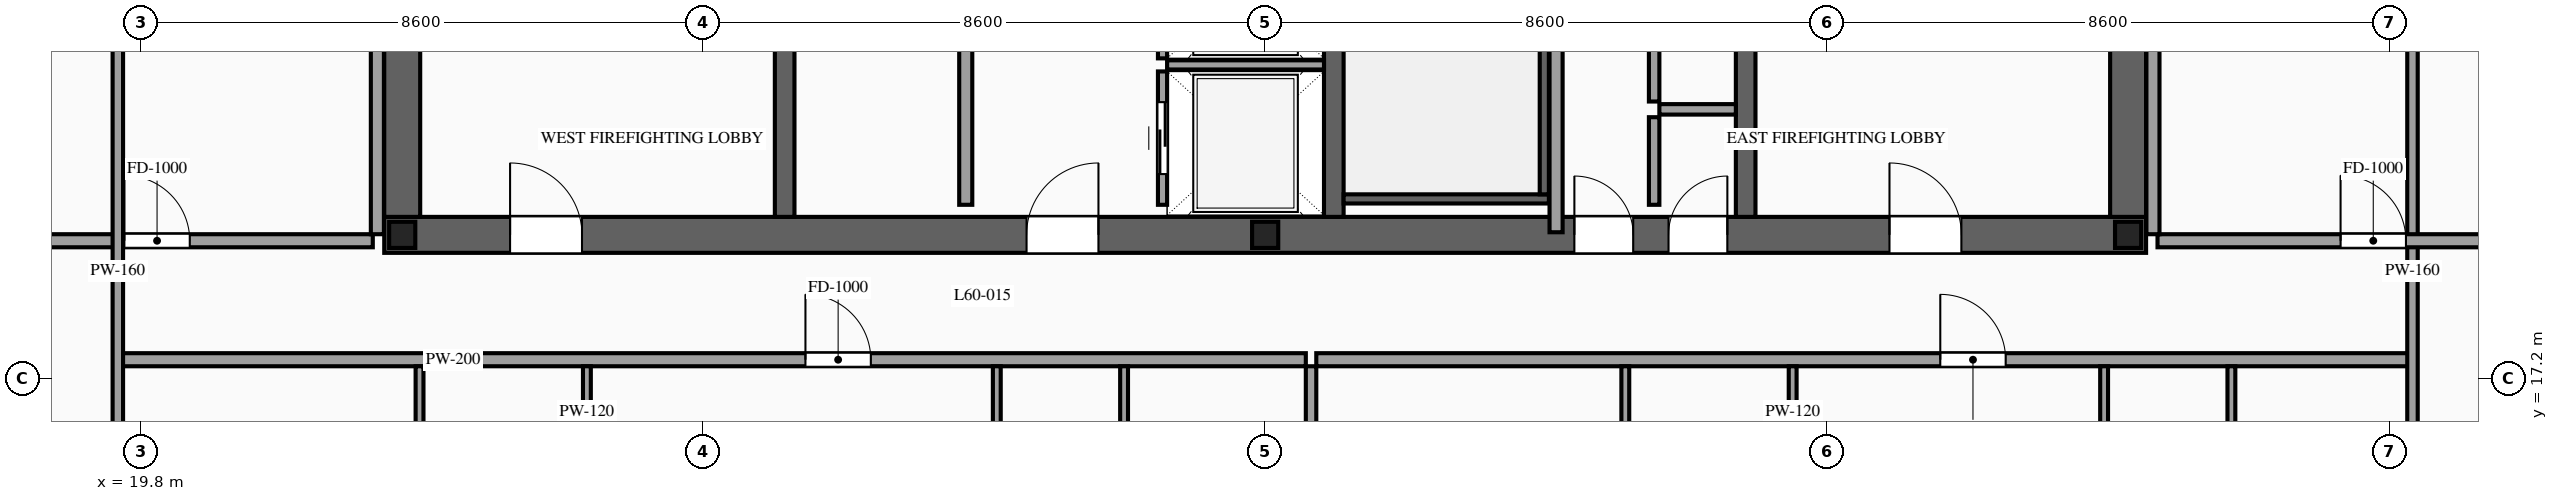
"""IFC4 building model, lengths in metres.
Left out: names, types, materials, properties, quantities, classifications, styles, units other than length and angle.
Written with IfcOpenShell. Run it as: python <this file> out.ifc"""

import sys

from ifc_helpers import new_model, si_unit, direction, frame, frame_2d, origin, origin_2d, place, context, subcontext, project, spatial, rectangle, i_section, extrude, source, transform, mapped, element, fill, save


model = new_model("IFC4")
c1 = context("Model", 3, precision=1e-05, world=origin(), true_north=direction((0.0, 1.0)))
c2 = subcontext(c1, "Body", "Model", "MODEL_VIEW")
j1 = project(units=[si_unit("LENGTHUNIT", "METRE"), si_unit("PLANEANGLEUNIT", "RADIAN")], contexts=[c1])
p1 = place(None, origin())
s1 = spatial("IfcSite", under=j1, at=p1, CompositionType="ELEMENT")
p2 = place(p1, origin())
s2 = spatial("IfcBuilding", under=s1, at=p2, CompositionType="ELEMENT")
p3 = place(p2, frame((0.0, 0.0, 227.6)))
s3 = spatial("IfcBuildingStorey", under=s2, at=p3, CompositionType="ELEMENT", Elevation=227.6)
p4 = place(p3, frame((23.525, 19.4, 0.0), z_axis=(0.0, 0.0, 1.0), x_axis=(1.0, 0.0, 0.0)))
e1 = element("IfcWall", 1, at=p4, inside=s3, PredefinedType="SHEAR", context=c2, shape_type="SweptSolid", body=[
    extrude(rectangle(XDim=26.95, YDim=0.55, at=frame_2d((13.475, 0.0))), origin(), (0.0, 0.0, 1.0), 3.5),
])
p5 = place(p4, frame((1.925, 0.0, 0.0)))
e2 = element("IfcOpeningElement", 2, at=p5, cuts=e1, PredefinedType="OPENING", context=c2, shape_type="SweptSolid", body=[
    extrude(rectangle(XDim=1.1, YDim=2.2, at=frame_2d((0.55, 1.1))), frame((0.0, 0.29, 0.0), z_axis=(0.0, -1.0, 0.0), x_axis=(1.0, 0.0, 0.0)), (0.0, 0.0, 1.0), 0.58),
])
p6 = place(p4, frame((9.825, 0.0, 0.0)))
e3 = element("IfcOpeningElement", 3, at=p6, cuts=e1, PredefinedType="OPENING", context=c2, shape_type="SweptSolid", body=[
    extrude(rectangle(XDim=1.1, YDim=2.2, at=frame_2d((0.55, 1.1))), frame((0.0, 0.29, 0.0), z_axis=(0.0, -1.0, 0.0), x_axis=(1.0, 0.0, 0.0)), (0.0, 0.0, 1.0), 0.58),
])
p7 = place(p4, frame((23.025, 0.0, 0.0)))
e4 = element("IfcOpeningElement", 4, at=p7, cuts=e1, PredefinedType="OPENING", context=c2, shape_type="SweptSolid", body=[
    extrude(rectangle(XDim=1.1, YDim=2.2, at=frame_2d((0.55, 1.1))), frame((0.0, 0.29, 0.0), z_axis=(0.0, -1.0, 0.0), x_axis=(1.0, 0.0, 0.0)), (0.0, 0.0, 1.0), 0.58),
])
p8 = place(p4, frame((19.645, 0.0, 0.0)))
e5 = element("IfcOpeningElement", 5, at=p8, cuts=e1, PredefinedType="OPENING", context=c2, shape_type="SweptSolid", body=[
    extrude(rectangle(XDim=0.9, YDim=2.15, at=frame_2d((0.45, 1.075))), frame((0.0, 0.29, 0.0), z_axis=(0.0, -1.0, 0.0), x_axis=(1.0, 0.0, 0.0)), (0.0, 0.0, 1.0), 0.58),
])
p9 = place(p4, frame((18.205, 0.0, 0.0)))
e6 = element("IfcOpeningElement", 6, at=p9, cuts=e1, PredefinedType="OPENING", context=c2, shape_type="SweptSolid", body=[
    extrude(rectangle(XDim=0.9, YDim=2.15, at=frame_2d((0.45, 1.075))), frame((0.0, 0.29, 0.0), z_axis=(0.0, -1.0, 0.0), x_axis=(1.0, 0.0, 0.0)), (0.0, 0.0, 1.0), 0.58),
])
m1 = source(origin(), c2, "Body", "SweptSolid", [
    extrude(rectangle(XDim=12.25, YDim=0.55, at=frame_2d((6.125, 0.0))), origin(), (0.0, 0.0, 1.0), 3.5),
])
for number, where, z_axis, x_axis in (
    (7, (23.8, 19.675, 0.0), (0.0, 0.0, 1.0), (0.0, 1.0, 0.0)),
    (8, (50.2, 19.675, 0.0), (0.0, 0.0, 1.0), (0.0, 1.0, 0.0)),
):
    element("IfcWall", number, at=place(p3, frame(where, z_axis=z_axis, x_axis=x_axis)), inside=s3, PredefinedType="SHEAR", context=c2, shape_type="MappedRepresentation", body=[
        mapped(m1, transform((0.0, 0.0, 0.0), scale=1.0)),
    ])
m2 = source(origin(), c2, "Body", "SweptSolid", [
    extrude(rectangle(XDim=12.25, YDim=0.3, at=frame_2d((6.125, 0.0))), origin(), (0.0, 0.0, 1.0), 3.5),
])
for number, where, z_axis, x_axis in (
    (9, (29.65, 19.675, 0.0), (0.0, 0.0, 1.0), (0.0, 1.0, 0.0)),
    (10, (38.05, 19.675, 0.0), (0.0, 0.0, 1.0), (0.0, 1.0, 0.0)),
    (11, (44.35, 19.675, 0.0), (0.0, 0.0, 1.0), (0.0, 1.0, 0.0)),
):
    element("IfcWall", number, at=place(p3, frame(where, z_axis=z_axis, x_axis=x_axis)), inside=s3, PredefinedType="SOLIDWALL", context=c2, shape_type="MappedRepresentation", body=[
        mapped(m2, transform((0.0, 0.0, 0.0), scale=1.0)),
    ])
m3 = source(origin(), c2, "Body", "SweptSolid", [
    extrude(i_section(OverallWidth=0.4, OverallDepth=0.4, WebThickness=0.013, FlangeThickness=0.021, at=origin_2d()), origin(), (0.0, 0.0, 1.0), 3.5),
])
for number, where, z_axis, x_axis in (
    (12, (23.8, 19.4, 0.0), (0.0, 0.0, 1.0), (1.0, 0.0, 0.0)),
    (13, (37.0, 19.4, 0.0), (0.0, 0.0, 1.0), (1.0, 0.0, 0.0)),
    (14, (50.2, 19.4, 0.0), (0.0, 0.0, 1.0), (1.0, 0.0, 0.0)),
):
    element("IfcColumn", number, at=place(p3, frame(where, z_axis=z_axis, x_axis=x_axis)), inside=s3, PredefinedType="COLUMN", context=c2, shape_type="MappedRepresentation", body=[
        mapped(m3, transform((0.0, 0.0, 0.0), scale=1.0)),
    ])
p10 = place(p3, frame((35.43, 19.86, 0.0), z_axis=(0.0, 0.0, 1.0), x_axis=(0.0, 1.0, 0.0)))
e15 = element("IfcWall", 15, at=p10, inside=s3, PredefinedType="SOLIDWALL", context=c2, shape_type="SweptSolid", body=[
    extrude(rectangle(XDim=2.04, YDim=0.14, at=frame_2d((1.02, 0.0))), origin(), (0.0, 0.0, 1.0), 3.28),
])
p11 = place(p10, frame((0.47, 0.0, 0.0)))
e16 = element("IfcOpeningElement", 16, at=p11, cuts=e15, PredefinedType="OPENING", context=c2, shape_type="SweptSolid", body=[
    extrude(rectangle(XDim=1.1, YDim=2.2, at=frame_2d((0.55, 1.1))), frame((0.0, 0.085, 0.0), z_axis=(0.0, -1.0, 0.0), x_axis=(1.0, 0.0, 0.0)), (0.0, 0.0, 1.0), 0.17),
])
m4 = source(origin(), c2, "Body", "SweptSolid", [
    extrude(rectangle(XDim=2.4, YDim=0.14, at=frame_2d((1.2, 0.0))), origin(), (0.0, 0.0, 1.0), 3.28),
])
p12 = place(p3, frame((35.5, 22.0, 0.0), z_axis=(0.0, 0.0, 1.0), x_axis=(1.0, 0.0, 0.0)))
e17 = element("IfcWall", 17, at=p12, inside=s3, PredefinedType="SOLIDWALL", context=c2, shape_type="MappedRepresentation", body=[
    mapped(m4, transform((0.0, 0.0, 0.0), scale=1.0)),
])
p13 = place(p3, frame((35.43, 22.1, 0.0), z_axis=(0.0, 0.0, 1.0), x_axis=(0.0, 1.0, 0.0)))
e18 = element("IfcWall", 18, at=p13, inside=s3, PredefinedType="SOLIDWALL", context=c2, shape_type="SweptSolid", body=[
    extrude(rectangle(XDim=2.2, YDim=0.14, at=frame_2d((1.1, 0.0))), origin(), (0.0, 0.0, 1.0), 3.28),
])
p14 = place(p13, frame((0.55, 0.0, 0.0)))
e19 = element("IfcOpeningElement", 19, at=p14, cuts=e18, PredefinedType="OPENING", context=c2, shape_type="SweptSolid", body=[
    extrude(rectangle(XDim=1.1, YDim=2.2, at=frame_2d((0.55, 1.1))), frame((0.0, 0.085, 0.0), z_axis=(0.0, -1.0, 0.0), x_axis=(1.0, 0.0, 0.0)), (0.0, 0.0, 1.0), 0.17),
])
m5 = source(origin(), c2, "Body", "SweptSolid", [
    extrude(rectangle(XDim=3.14, YDim=0.14, at=frame_2d((1.57, 0.0))), origin(), (0.0, 0.0, 1.0), 3.28),
])
p15 = place(p3, frame((38.2, 19.95, 0.0), z_axis=(0.0, 0.0, 1.0), x_axis=(1.0, 0.0, 0.0)))
e20 = element("IfcWall", 20, at=p15, inside=s3, PredefinedType="SOLIDWALL", context=c2, shape_type="MappedRepresentation", body=[
    mapped(m5, transform((0.0, 0.0, 0.0), scale=1.0)),
])
m6 = source(origin(), c2, "Body", "SweptSolid", [
    extrude(rectangle(XDim=8.94, YDim=0.14, at=frame_2d((4.47, 0.0))), origin(), (0.0, 0.0, 1.0), 3.28),
])
p16 = place(p3, frame((41.27, 20.02, 0.0), z_axis=(0.0, 0.0, 1.0), x_axis=(0.0, 1.0, 0.0)))
e21 = element("IfcWall", 21, at=p16, inside=s3, PredefinedType="SOLIDWALL", context=c2, shape_type="MappedRepresentation", body=[
    mapped(m6, transform((0.0, 0.0, 0.0), scale=1.0)),
])
p17 = place(p3, frame((32.42, 19.86, 0.0), z_axis=(0.0, 0.0, 1.0), x_axis=(0.0, 1.0, 0.0)))
e22 = element("IfcWall", 22, at=p17, inside=s3, PredefinedType="PARTITIONING", context=c2, shape_type="SweptSolid", body=[
    extrude(rectangle(XDim=5.84, YDim=0.2, at=frame_2d((2.92, 0.0))), origin(), (0.0, 0.0, 1.0), 3.28),
])
p18 = place(p17, frame((2.47, 0.0, 0.0)))
e23 = element("IfcOpeningElement", 23, at=p18, cuts=e22, PredefinedType="OPENING", context=c2, shape_type="SweptSolid", body=[
    extrude(rectangle(XDim=0.9, YDim=2.15, at=frame_2d((0.45, 1.075))), frame((0.0, 0.115, 0.0), z_axis=(0.0, -1.0, 0.0), x_axis=(1.0, 0.0, 0.0)), (0.0, 0.0, 1.0), 0.23),
])
m7 = source(origin(), c2, "Body", "SweptSolid", [
    extrude(rectangle(XDim=1.34, YDim=0.16, at=frame_2d((0.67, 0.0))), origin(), (0.0, 0.0, 1.0), 3.28),
])
p19 = place(p3, frame((42.95, 19.86, 0.0), z_axis=(0.0, 0.0, 1.0), x_axis=(0.0, 1.0, 0.0)))
e24 = element("IfcWall", 24, at=p19, inside=s3, PredefinedType="PARTITIONING", context=c2, shape_type="MappedRepresentation", body=[
    mapped(m7, transform((0.0, 0.0, 0.0), scale=1.0)),
])
m8 = source(origin(), c2, "Body", "SweptSolid", [
    extrude(rectangle(XDim=1.17, YDim=0.16, at=frame_2d((0.585, 0.0))), origin(), (0.0, 0.0, 1.0), 3.28),
])
p20 = place(p3, frame((43.03, 21.32, 0.0), z_axis=(0.0, 0.0, 1.0), x_axis=(1.0, 0.0, 0.0)))
e25 = element("IfcWall", 25, at=p20, inside=s3, PredefinedType="PARTITIONING", context=c2, shape_type="MappedRepresentation", body=[
    mapped(m8, transform((0.0, 0.0, 0.0), scale=1.0)),
])
m9 = source(origin(), c2, "Body", "SweptSolid", [
    extrude(rectangle(XDim=12.72, YDim=0.2, at=frame_2d((6.36, 0.0))), origin(), (0.0, 0.0, 1.0), 3.28),
])
p21 = place(p3, frame((41.45, 19.44, 0.0), z_axis=(0.0, 0.0, 1.0), x_axis=(0.0, 1.0, 0.0)))
e26 = element("IfcWall", 26, at=p21, inside=s3, PredefinedType="PARTITIONING", context=c2, shape_type="MappedRepresentation", body=[
    mapped(m9, transform((0.0, 0.0, 0.0), scale=1.0)),
])
m10 = source(origin(), c2, "Body", "SweptSolid", [
    extrude(rectangle(XDim=10.72, YDim=0.16, at=frame_2d((5.36, 0.0))), origin(), (0.0, 0.0, 1.0), 3.28),
])
p22 = place(p3, frame((42.95, 21.44, 0.0), z_axis=(0.0, 0.0, 1.0), x_axis=(0.0, 1.0, 0.0)))
e27 = element("IfcWall", 27, at=p22, inside=s3, PredefinedType="PARTITIONING", context=c2, shape_type="MappedRepresentation", body=[
    mapped(m10, transform((0.0, 0.0, 0.0), scale=1.0)),
])
p23 = place(p3, frame((19.44, 17.49, 0.0), z_axis=(0.0, 0.0, 1.0), x_axis=(1.0, 0.0, 0.0)))
e28 = element("IfcWall", 28, at=p23, inside=s3, PredefinedType="PARTITIONING", context=c2, shape_type="SweptSolid", body=[
    extrude(rectangle(XDim=18.182, YDim=0.2, at=frame_2d((9.091, 0.0))), origin(), (0.0, 0.0, 1.0), 3.28),
])
p24 = place(p23, frame((10.528, 0.0, 0.0)))
e29 = element("IfcOpeningElement", 29, at=p24, cuts=e28, PredefinedType="OPENING", context=c2, shape_type="SweptSolid", body=[
    extrude(rectangle(XDim=1.0, YDim=2.2, at=frame_2d((0.5, 1.1))), frame((0.0, 0.115, 0.0), z_axis=(0.0, -1.0, 0.0), x_axis=(1.0, 0.0, 0.0)), (0.0, 0.0, 1.0), 0.23),
])
m11 = source(origin(), c2, "Body", "SweptSolid", [
    extrude(rectangle(XDim=12.04, YDim=0.16, at=frame_2d((6.02, 0.0))), origin(), (0.0, 0.0, 1.0), 3.28),
])
p25 = place(p3, frame((37.702, 5.35, 0.0), z_axis=(0.0, 0.0, 1.0), x_axis=(0.0, 1.0, 0.0)))
e30 = element("IfcWall", 30, at=p25, inside=s3, PredefinedType="PARTITIONING", context=c2, shape_type="MappedRepresentation", body=[
    mapped(m11, transform((0.0, 0.0, 0.0), scale=1.0)),
])
m12 = source(origin(), c2, "Body", "SweptSolid", [
    extrude(rectangle(XDim=4.11, YDim=0.12, at=frame_2d((2.055, 0.0))), origin(), (0.0, 0.0, 1.0), 3.28),
])
p26 = place(p3, frame((24.065, 13.28, 0.0), z_axis=(0.0, 0.0, 1.0), x_axis=(0.0, 1.0, 0.0)))
e31 = element("IfcWall", 31, at=p26, inside=s3, PredefinedType="PARTITIONING", context=c2, shape_type="MappedRepresentation", body=[
    mapped(m12, transform((0.0, 0.0, 0.0), scale=1.0)),
])
p27 = place(p3, frame((26.625, 13.28, 0.0), z_axis=(0.0, 0.0, 1.0), x_axis=(0.0, 1.0, 0.0)))
e32 = element("IfcWall", 32, at=p27, inside=s3, PredefinedType="PARTITIONING", context=c2, shape_type="SweptSolid", body=[
    extrude(rectangle(XDim=4.11, YDim=0.12, at=frame_2d((2.055, 0.0))), origin(), (0.0, 0.0, 1.0), 3.28),
])
p28 = place(p27, frame((1.63, 0.0, 0.0)))
e33 = element("IfcOpeningElement", 33, at=p28, cuts=e32, PredefinedType="OPENING", context=c2, shape_type="SweptSolid", body=[
    extrude(rectangle(XDim=0.85, YDim=2.1, at=frame_2d((0.425, 1.05))), frame((0.0, 0.075, 0.0), z_axis=(0.0, -1.0, 0.0), x_axis=(1.0, 0.0, 0.0)), (0.0, 0.0, 1.0), 0.15),
])
for number, where, z_axis, x_axis in (
    (34, (34.842, 13.28, 0.0), (0.0, 0.0, 1.0), (0.0, 1.0, 0.0)),
    (35, (32.895, 13.28, 0.0), (0.0, 0.0, 1.0), (0.0, 1.0, 0.0)),
):
    element("IfcWall", number, at=place(p3, frame(where, z_axis=z_axis, x_axis=x_axis)), inside=s3, PredefinedType="PARTITIONING", context=c2, shape_type="MappedRepresentation", body=[
        mapped(m12, transform((0.0, 0.0, 0.0), scale=1.0)),
    ])
p29 = place(p3, frame((37.782, 17.49, 0.0), z_axis=(0.0, 0.0, 1.0), x_axis=(1.0, 0.0, 0.0)))
e36 = element("IfcWall", 36, at=p29, inside=s3, PredefinedType="PARTITIONING", context=c2, shape_type="SweptSolid", body=[
    extrude(rectangle(XDim=16.778, YDim=0.2, at=frame_2d((8.389, 0.0))), origin(), (0.0, 0.0, 1.0), 3.28),
])
p30 = place(p29, frame((9.545, 0.0, 0.0)))
e37 = element("IfcOpeningElement", 37, at=p30, cuts=e36, PredefinedType="OPENING", context=c2, shape_type="SweptSolid", body=[
    extrude(rectangle(XDim=1.0, YDim=2.2, at=frame_2d((0.5, 1.1))), frame((0.0, 0.115, 0.0), z_axis=(0.0, -1.0, 0.0), x_axis=(1.0, 0.0, 0.0)), (0.0, 0.0, 1.0), 0.23),
])
p31 = place(p3, frame((42.509, 13.28, 0.0), z_axis=(0.0, 0.0, 1.0), x_axis=(0.0, 1.0, 0.0)))
e38 = element("IfcWall", 38, at=p31, inside=s3, PredefinedType="PARTITIONING", context=c2, shape_type="MappedRepresentation", body=[
    mapped(m12, transform((0.0, 0.0, 0.0), scale=1.0)),
])
p32 = place(p3, frame((45.069, 13.28, 0.0), z_axis=(0.0, 0.0, 1.0), x_axis=(0.0, 1.0, 0.0)))
e39 = element("IfcWall", 39, at=p32, inside=s3, PredefinedType="PARTITIONING", context=c2, shape_type="SweptSolid", body=[
    extrude(rectangle(XDim=4.11, YDim=0.12, at=frame_2d((2.055, 0.0))), origin(), (0.0, 0.0, 1.0), 3.28),
])
p33 = place(p32, frame((1.63, 0.0, 0.0)))
e40 = element("IfcOpeningElement", 40, at=p33, cuts=e39, PredefinedType="OPENING", context=c2, shape_type="SweptSolid", body=[
    extrude(rectangle(XDim=0.85, YDim=2.1, at=frame_2d((0.425, 1.05))), frame((0.0, 0.075, 0.0), z_axis=(0.0, -1.0, 0.0), x_axis=(1.0, 0.0, 0.0)), (0.0, 0.0, 1.0), 0.15),
])
for number, where, z_axis, x_axis in (
    (41, (51.78, 13.28, 0.0), (0.0, 0.0, 1.0), (0.0, 1.0, 0.0)),
    (42, (49.833, 13.28, 0.0), (0.0, 0.0, 1.0), (0.0, 1.0, 0.0)),
):
    element("IfcWall", number, at=place(p3, frame(where, z_axis=z_axis, x_axis=x_axis)), inside=s3, PredefinedType="PARTITIONING", context=c2, shape_type="MappedRepresentation", body=[
        mapped(m12, transform((0.0, 0.0, 0.0), scale=1.0)),
    ])
p34 = place(p3, frame((16.55, 19.31, 0.0), z_axis=(0.0, 0.0, 1.0), x_axis=(1.0, 0.0, 0.0)))
e43 = element("IfcWall", 43, at=p34, inside=s3, PredefinedType="PARTITIONING", context=c2, shape_type="SweptSolid", body=[
    extrude(rectangle(XDim=6.8, YDim=0.2, at=frame_2d((3.4, 0.0))), origin(), (0.0, 0.0, 1.0), 2.825),
])
p35 = place(p34, frame((3.0, 0.0, 0.0)))
e44 = element("IfcOpeningElement", 44, at=p35, cuts=e43, PredefinedType="OPENING", context=c2, shape_type="SweptSolid", body=[
    extrude(rectangle(XDim=1.0, YDim=2.2, at=frame_2d((0.5, 1.1))), frame((0.0, 0.115, 0.0), z_axis=(0.0, -1.0, 0.0), x_axis=(1.0, 0.0, 0.0)), (0.0, 0.0, 1.0), 0.23),
])
m13 = source(origin(), c2, "Body", "SweptSolid", [
    extrude(rectangle(XDim=6.29, YDim=0.2, at=frame_2d((3.145, 0.0))), origin(), (0.0, 0.0, 1.0), 3.28),
])
p36 = place(p3, frame((23.42, 19.41, 0.0), z_axis=(0.0, 0.0, 1.0), x_axis=(0.0, 1.0, 0.0)))
e45 = element("IfcWall", 45, at=p36, inside=s3, PredefinedType="PARTITIONING", context=c2, shape_type="MappedRepresentation", body=[
    mapped(m13, transform((0.0, 0.0, 0.0), scale=1.0)),
])
m14 = source(origin(), c2, "Body", "SweptSolid", [
    extrude(rectangle(XDim=26.69, YDim=0.16, at=frame_2d((13.345, 0.0))), origin(), (0.0, 0.0, 1.0), 3.28),
])
for number, where, z_axis, x_axis in (
    (46, (19.45, 5.5, 0.0), (0.0, 0.0, 1.0), (0.0, 1.0, 0.0)),
    (47, (54.55, 5.5, 0.0), (0.0, 0.0, 1.0), (0.0, 1.0, 0.0)),
):
    element("IfcWall", number, at=place(p3, frame(where, z_axis=z_axis, x_axis=x_axis)), inside=s3, PredefinedType="PARTITIONING", context=c2, shape_type="MappedRepresentation", body=[
        mapped(m14, transform((0.0, 0.0, 0.0), scale=1.0)),
    ])
p37 = place(p3, frame((50.65, 19.31, 0.0), z_axis=(0.0, 0.0, 1.0), x_axis=(1.0, 0.0, 0.0)))
e48 = element("IfcWall", 48, at=p37, inside=s3, PredefinedType="PARTITIONING", context=c2, shape_type="SweptSolid", body=[
    extrude(rectangle(XDim=6.8, YDim=0.2, at=frame_2d((3.4, 0.0))), origin(), (0.0, 0.0, 1.0), 2.825),
])
p38 = place(p37, frame((2.8, 0.0, 0.0)))
e49 = element("IfcOpeningElement", 49, at=p38, cuts=e48, PredefinedType="OPENING", context=c2, shape_type="SweptSolid", body=[
    extrude(rectangle(XDim=1.0, YDim=2.2, at=frame_2d((0.5, 1.1))), frame((0.0, 0.115, 0.0), z_axis=(0.0, -1.0, 0.0), x_axis=(1.0, 0.0, 0.0)), (0.0, 0.0, 1.0), 0.23),
])
p39 = place(p3, frame((50.58, 19.41, 0.0), z_axis=(0.0, 0.0, 1.0), x_axis=(0.0, 1.0, 0.0)))
e50 = element("IfcWall", 50, at=p39, inside=s3, PredefinedType="PARTITIONING", context=c2, shape_type="MappedRepresentation", body=[
    mapped(m13, transform((0.0, 0.0, 0.0), scale=1.0)),
])
m15 = source(origin(), c2, "Body", "SweptSolid", [
    extrude(rectangle(XDim=1.1, YDim=2.2, at=frame_2d((0.55, 1.1))), frame((0.0, 0.025, 0.0), z_axis=(0.0, -1.0, 0.0), x_axis=(1.0, 0.0, 0.0)), (0.0, 0.0, 1.0), 0.05),
])
p40 = place(p11, origin())
e51 = element("IfcDoor", 51, at=p40, inside=s3, OperationType="SLIDING_TO_RIGHT", PredefinedType="DOOR", context=c2, shape_type="MappedRepresentation", body=[
    mapped(m15, transform((0.0, 0.0, 0.0), scale=1.0)),
])
fill(e16, e51)
m16 = source(origin(), c2, "Body", "SweptSolid", [
    extrude(rectangle(XDim=1.1, YDim=2.2, at=frame_2d((0.55, 1.1))), frame((0.0, 0.025, 0.0), z_axis=(0.0, -1.0, 0.0), x_axis=(1.0, 0.0, 0.0)), (0.0, 0.0, 1.0), 0.05),
])
p41 = place(p5, origin())
e52 = element("IfcDoor", 52, at=p41, inside=s3, OperationType="SINGLE_SWING_LEFT", PredefinedType="DOOR", context=c2, shape_type="MappedRepresentation", body=[
    mapped(m16, transform((0.0, 0.0, 0.0), scale=1.0)),
])
fill(e2, e52)
p42 = place(p6, origin())
e53 = element("IfcDoor", 53, at=p42, inside=s3, OperationType="SINGLE_SWING_RIGHT", PredefinedType="DOOR", context=c2, shape_type="MappedRepresentation", body=[
    mapped(m16, transform((0.0, 0.0, 0.0), scale=1.0)),
])
fill(e3, e53)
p43 = place(p7, origin())
e54 = element("IfcDoor", 54, at=p43, inside=s3, OperationType="SINGLE_SWING_LEFT", PredefinedType="DOOR", context=c2, shape_type="MappedRepresentation", body=[
    mapped(m16, transform((0.0, 0.0, 0.0), scale=1.0)),
])
fill(e4, e54)
m17 = source(origin(), c2, "Body", "SweptSolid", [
    extrude(rectangle(XDim=0.9, YDim=2.15, at=frame_2d((0.45, 1.075))), frame((0.0, 0.025, 0.0), z_axis=(0.0, -1.0, 0.0), x_axis=(1.0, 0.0, 0.0)), (0.0, 0.0, 1.0), 0.05),
])
p44 = place(p8, origin())
e55 = element("IfcDoor", 55, at=p44, inside=s3, OperationType="SINGLE_SWING_RIGHT", PredefinedType="DOOR", context=c2, shape_type="MappedRepresentation", body=[
    mapped(m17, transform((0.0, 0.0, 0.0), scale=1.0)),
])
fill(e5, e55)
p45 = place(p9, origin())
e56 = element("IfcDoor", 56, at=p45, inside=s3, OperationType="SINGLE_SWING_LEFT", PredefinedType="DOOR", context=c2, shape_type="MappedRepresentation", body=[
    mapped(m17, transform((0.0, 0.0, 0.0), scale=1.0)),
])
fill(e6, e56)
m18 = source(origin(), c2, "Body", "SweptSolid", [
    extrude(rectangle(XDim=1.0, YDim=2.2, at=frame_2d((0.5, 1.1))), frame((0.0, 0.025, 0.0), z_axis=(0.0, -1.0, 0.0), x_axis=(1.0, 0.0, 0.0)), (0.0, 0.0, 1.0), 0.05),
])
p46 = place(p24, origin())
e57 = element("IfcDoor", 57, at=p46, inside=s3, OperationType="SINGLE_SWING_LEFT", PredefinedType="DOOR", context=c2, shape_type="MappedRepresentation", body=[
    mapped(m18, transform((0.0, 0.0, 0.0), scale=1.0)),
])
fill(e29, e57)
p47 = place(p30, origin())
e58 = element("IfcDoor", 58, at=p47, inside=s3, OperationType="SINGLE_SWING_LEFT", PredefinedType="DOOR", context=c2, shape_type="MappedRepresentation", body=[
    mapped(m18, transform((0.0, 0.0, 0.0), scale=1.0)),
])
fill(e37, e58)
p48 = place(p35, origin())
e59 = element("IfcDoor", 59, at=p48, inside=s3, OperationType="SINGLE_SWING_LEFT", PredefinedType="DOOR", context=c2, shape_type="MappedRepresentation", body=[
    mapped(m18, transform((0.0, 0.0, 0.0), scale=1.0)),
])
fill(e44, e59)
p49 = place(p38, origin())
e60 = element("IfcDoor", 60, at=p49, inside=s3, OperationType="SINGLE_SWING_LEFT", PredefinedType="DOOR", context=c2, shape_type="MappedRepresentation", body=[
    mapped(m18, transform((0.0, 0.0, 0.0), scale=1.0)),
])
fill(e49, e60)
save(model, sys.argv[1])
